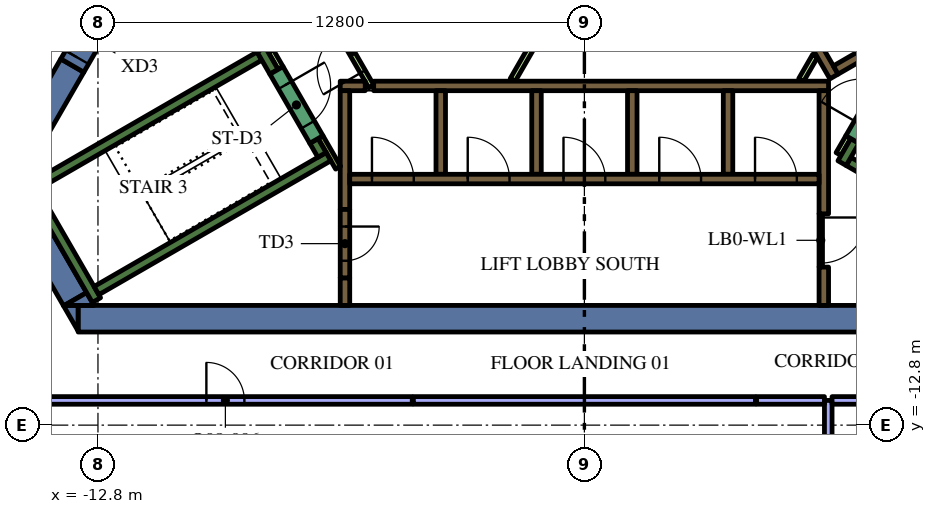
"""IFC4 building model, lengths in metres.
Left out: names, types, materials, properties, quantities, classifications, styles, units other than length and angle.
Written with IfcOpenShell. Run it as: python <this file> out.ifc"""

import sys

from ifc_helpers import new_model, si_unit, direction, frame, frame_2d, origin, place, context, subcontext, project, spatial, polyline, rectangle, outline, extrude, element, fill, save


model = new_model("IFC4")
c1 = context("Model", 3, precision=1e-05, world=origin(), true_north=direction((0.0, 1.0)))
c2 = subcontext(c1, "Body", "Model", "MODEL_VIEW")
j1 = project(units=[si_unit("LENGTHUNIT", "METRE"), si_unit("PLANEANGLEUNIT", "RADIAN")], contexts=[c1])
p1 = place(None, origin())
s1 = spatial("IfcSite", under=j1, at=p1, CompositionType="ELEMENT")
p2 = place(p1, origin())
s2 = spatial("IfcBuilding", under=s1, at=p2, CompositionType="ELEMENT")
p3 = place(p2, frame((0.0, 0.0, 235.2)))
s3 = spatial("IfcBuildingStorey", under=s2, at=p3, CompositionType="ELEMENT", Elevation=235.2)
p4 = place(p3, frame((8.904, -10.0, 0.0), z_axis=(0.0, 0.0, 1.0), x_axis=(-1.0, 0.0, 0.0)))
e1 = element("IfcWall", 1, at=p4, inside=s3, PredefinedType="SOLIDWALL", context=c2, shape_type="SweptSolid", body=[
    extrude(rectangle(XDim=22.226, YDim=0.7, at=frame_2d((11.113, 0.0))), origin(), (0.0, 0.0, 1.0), 4.2),
])
p5 = place(p3, origin())
e2 = element("IfcWall", 2, at=p5, inside=s3, PredefinedType="SOLIDWALL", context=c2, shape_type="SweptSolid", body=[
    extrude(outline(polyline([(-13.712, -9.65), (-13.324, -9.65), (-13.324, -10.322), (-13.712, -9.65)])), origin(), (0.0, 0.0, 1.0), 4.2),
])
p6 = place(p3, frame((-13.402, -9.487, 0.0), z_axis=(0.0, 0.0, 1.0), x_axis=(-0.500020498207, 0.866013568815, 0.0)))
e3 = element("IfcWall", 3, at=p6, inside=s3, PredefinedType="SOLIDWALL", context=c2, shape_type="SweptSolid", body=[
    extrude(rectangle(XDim=3.829, YDim=0.7, at=frame_2d((1.915, 0.0))), origin(), (0.0, 0.0, 1.0), 4.2),
])
e4 = element("IfcWall", 4, at=p5, inside=s3, PredefinedType="SOLIDWALL", context=c2, shape_type="SweptSolid", body=[
    extrude(outline(polyline([(-12.904, -9.65), (-13.68, -9.65), (-13.098, -9.314), (-12.904, -9.65)])), origin(), (0.0, 0.0, 1.0), 4.2),
])
p7 = place(p3, frame((-13.475, -3.339, 0.0), z_axis=(0.0, 0.0, 1.0), x_axis=(-0.499944726303, -0.866057313716, 0.0)))
e5 = element("IfcWall", 5, at=p7, inside=s3, PredefinedType="SOLIDWALL", context=c2, shape_type="SweptSolid", body=[
    extrude(rectangle(XDim=2.884, YDim=0.7, at=frame_2d((1.442, 0.0))), origin(), (0.0, 0.0, 1.0), 4.2),
])
p8 = place(p3, frame((12.84, -9.261, 0.0), z_axis=(0.0, 0.0, 1.0), x_axis=(-0.866013990052, 0.500019768644, 0.0)))
e6 = element("IfcWall", 6, at=p8, inside=s3, PredefinedType="SOLIDWALL", context=c2, shape_type="SweptSolid", body=[
    extrude(rectangle(XDim=6.8, YDim=0.25, at=frame_2d((3.4, 0.0))), origin(), (0.0, 0.0, 1.0), 4.2),
])
p9 = place(p3, frame((6.78, -5.906, 0.0), z_axis=(0.0, 0.0, 1.0), x_axis=(0.500223362819, 0.865896406789, 0.0)))
e7 = element("IfcWall", 7, at=p9, inside=s3, PredefinedType="SOLIDWALL", context=c2, shape_type="SweptSolid", body=[
    extrude(rectangle(XDim=0.675, YDim=0.25, at=frame_2d((0.337, 0.0))), origin(), (0.0, 0.0, 1.0), 4.2),
])
p10 = place(p3, frame((-12.84, -9.511, 0.0), z_axis=(0.0, 0.0, 1.0), x_axis=(-0.499997733992, 0.866026712061, 0.0)))
e8 = element("IfcWall", 8, at=p10, inside=s3, PredefinedType="SOLIDWALL", context=c2, shape_type="SweptSolid", body=[
    extrude(rectangle(XDim=3.634, YDim=0.25, at=frame_2d((1.817, 0.0))), origin(), (0.0, 0.0, 1.0), 4.2),
])
p11 = place(p3, frame((-14.44, -6.49, 0.0), z_axis=(0.0, 0.0, 1.0), x_axis=(0.866022966069, 0.500004222222, 0.0)))
e9 = element("IfcWall", 9, at=p11, inside=s3, PredefinedType="SOLIDWALL", context=c2, shape_type="SweptSolid", body=[
    extrude(rectangle(XDim=6.8, YDim=0.25, at=frame_2d((3.4, 0.0))), origin(), (0.0, 0.0, 1.0), 4.2),
])
p12 = place(p3, frame((-8.168, -3.503, 0.0), z_axis=(0.0, 0.0, 1.0), x_axis=(-0.499952099219, 0.866053057547, 0.0)))
e10 = element("IfcWall", 10, at=p12, inside=s3, PredefinedType="SOLIDWALL", context=c2, shape_type="SweptSolid", body=[
    extrude(rectangle(XDim=0.675, YDim=0.25, at=frame_2d((0.337, 0.0))), origin(), (0.0, 0.0, 1.0), 4.2),
])
p13 = place(p3, frame((-12.84, -9.261, 0.0), z_axis=(0.0, 0.0, 1.0), x_axis=(0.866016039709, 0.500016218704, 0.0)))
e11 = element("IfcWall", 11, at=p13, inside=s3, PredefinedType="SOLIDWALL", context=c2, shape_type="SweptSolid", body=[
    extrude(rectangle(XDim=7.05, YDim=0.25, at=frame_2d((3.525, 0.0))), origin(), (0.0, 0.0, 1.0), 4.2),
])
p14 = place(p3, frame((-6.905, -5.69, 0.0), z_axis=(0.0, 0.0, 1.0), x_axis=(-0.500402024738, 0.865793170242, 0.0)))
e12 = element("IfcWall", 12, at=p14, inside=s3, PredefinedType="SOLIDWALL", context=c2, shape_type="SweptSolid", body=[
    extrude(rectangle(XDim=0.425, YDim=0.25, at=frame_2d((0.212, 0.0))), origin(), (0.0, 0.0, 1.0), 4.2),
])
p15 = place(p3, frame((-6.3, -8.925, 0.0), z_axis=(0.0, 0.0, 1.0), x_axis=(0.0, -1.0, 0.0)))
e13 = element("IfcWall", 13, at=p15, inside=s3, PredefinedType="SOLIDWALL", context=c2, shape_type="SweptSolid", body=[
    extrude(rectangle(XDim=0.725, YDim=0.25, at=frame_2d((0.363, 0.0))), origin(), (0.0, 0.0, 1.0), 4.2),
])
p16 = place(p3, frame((-5.545, -3.875, 0.0), z_axis=(0.0, 0.0, 1.0), x_axis=(1.0, 0.0, 0.0)))
e14 = element("IfcWall", 14, at=p16, inside=s3, PredefinedType="SOLIDWALL", context=c2, shape_type="SweptSolid", body=[
    extrude(rectangle(XDim=11.97, YDim=0.25, at=frame_2d((5.985, 0.0))), origin(), (0.0, 0.0, 1.0), 4.2),
])
p17 = place(p3, frame((-6.425, -3.875, 0.0), z_axis=(0.0, 0.0, 1.0), x_axis=(1.0, 0.0, 0.0)))
e15 = element("IfcWall", 15, at=p17, inside=s3, PredefinedType="SOLIDWALL", context=c2, shape_type="SweptSolid", body=[
    extrude(rectangle(XDim=0.658, YDim=0.25, at=frame_2d((0.329, 0.0))), origin(), (0.0, 0.0, 1.0), 4.2),
])
p18 = place(p3, frame((6.3, -7.24, 0.0), z_axis=(0.0, 0.0, 1.0), x_axis=(0.0, 1.0, 0.0)))
e16 = element("IfcWall", 16, at=p18, inside=s3, PredefinedType="SOLIDWALL", context=c2, shape_type="SweptSolid", body=[
    extrude(rectangle(XDim=3.24, YDim=0.25, at=frame_2d((1.62, 0.0))), origin(), (0.0, 0.0, 1.0), 4.2),
])
p19 = place(p3, frame((6.3, -9.65, 0.0), z_axis=(0.0, 0.0, 1.0), x_axis=(0.0, 1.0, 0.0)))
e17 = element("IfcWall", 17, at=p19, inside=s3, PredefinedType="SOLIDWALL", context=c2, shape_type="SweptSolid", body=[
    extrude(rectangle(XDim=1.008, YDim=0.25, at=frame_2d((0.504, 0.0))), origin(), (0.0, 0.0, 1.0), 4.2),
])
for number, where, z_axis, x_axis in (
    (18, (3.78, -4.0, 0.0), (0.0, 0.0, 1.0), (0.0, -1.0, 0.0)),
    (19, (1.26, -4.0, 0.0), (0.0, 0.0, 1.0), (0.0, -1.0, 0.0)),
    (20, (-1.26, -4.0, 0.0), (0.0, 0.0, 1.0), (0.0, -1.0, 0.0)),
    (21, (-3.78, -4.0, 0.0), (0.0, 0.0, 1.0), (0.0, -1.0, 0.0)),
):
    element("IfcWall", number, at=place(p3, frame(where, z_axis=z_axis, x_axis=x_axis)), inside=s3, PredefinedType="SOLIDWALL", context=c2, shape_type="SweptSolid", body=[
        extrude(rectangle(XDim=2.2, YDim=0.25, at=frame_2d((1.1, 0.0))), origin(), (0.0, 0.0, 1.0), 4.2),
    ])
p20 = place(p3, frame((-6.3, -7.125, 0.0), z_axis=(0.0, 0.0, 1.0), x_axis=(0.0, 1.0, 0.0)))
e22 = element("IfcWall", 22, at=p20, inside=s3, PredefinedType="SOLIDWALL", context=c2, shape_type="SweptSolid", body=[
    extrude(rectangle(XDim=3.125, YDim=0.25, at=frame_2d((1.562, 0.0))), origin(), (0.0, 0.0, 1.0), 4.2),
])
p21 = place(p3, frame((6.568, -3.627, 0.0), z_axis=(0.0, 0.0, 1.0), x_axis=(-0.499999455981, 0.866025717874, 0.0)))
e23 = element("IfcWall", 23, at=p21, inside=s3, PredefinedType="SOLIDWALL", context=c2, shape_type="SweptSolid", body=[
    extrude(rectangle(XDim=11.978, YDim=0.25, at=frame_2d((5.989, 0.0))), origin(), (0.0, 0.0, 1.0), 4.2),
])
p22 = place(p3, frame((6.614, -3.456, 0.0), z_axis=(0.0, 0.0, 1.0), x_axis=(0.866032512851, 0.499987686533, 0.0)))
e24 = element("IfcWall", 24, at=p22, inside=s3, PredefinedType="SOLIDWALL", context=c2, shape_type="SweptSolid", body=[
    extrude(rectangle(XDim=2.975, YDim=0.25, at=frame_2d((1.487, 0.0))), origin(), (0.0, 0.0, 1.0), 4.2),
])
p23 = place(p3, frame((-8.252, -2.958, 0.0), z_axis=(0.0, 0.0, 1.0), x_axis=(0.500174715838, -0.865924508047, 0.0)))
e25 = element("IfcWall", 25, at=p23, inside=s3, PredefinedType="PARTITIONING", context=c2, shape_type="SweptSolid", body=[
    extrude(rectangle(XDim=0.514, YDim=0.15, at=frame_2d((0.257, 0.0))), origin(), (0.0, 0.0, 1.0), 3.45),
])
p24 = place(p3, frame((-6.48, -6.027, 0.0), z_axis=(0.0, 0.0, 1.0), x_axis=(-0.499927229454, 0.866067413802, 0.0)))
e26 = element("IfcWall", 26, at=p24, inside=s3, PredefinedType="PARTITIONING", context=c2, shape_type="SweptSolid", body=[
    extrude(rectangle(XDim=0.929, YDim=0.15, at=frame_2d((0.464, 0.0))), origin(), (0.0, 0.0, 1.0), 4.2),
])
p25 = place(p3, frame((6.945, -5.222, 0.0), z_axis=(0.0, 0.0, 1.0), x_axis=(-0.499818422106, -0.866130212453, 0.0)))
e27 = element("IfcWall", 27, at=p25, inside=s3, PredefinedType="PARTITIONING", context=c2, shape_type="SweptSolid", body=[
    extrude(rectangle(XDim=0.514, YDim=0.15, at=frame_2d((0.257, 0.0))), origin(), (0.0, 0.0, 1.0), 3.45),
])
p26 = place(p3, frame((5.705, -3.718, 0.0), z_axis=(0.0, 0.0, 1.0), x_axis=(0.499962090823, 0.866047289552, 0.0)))
e28 = element("IfcWall", 28, at=p26, inside=s3, PredefinedType="PARTITIONING", context=c2, shape_type="SweptSolid", body=[
    extrude(rectangle(XDim=0.735, YDim=0.15, at=frame_2d((0.367, 0.0))), origin(), (0.0, 0.0, 1.0), 3.45),
])
p27 = place(p3, frame((-1.887, -3.718, 0.0), z_axis=(0.0, 0.0, 1.0), x_axis=(0.500043732237, 0.866000153493, 0.0)))
e29 = element("IfcWall", 29, at=p27, inside=s3, PredefinedType="PARTITIONING", context=c2, shape_type="SweptSolid", body=[
    extrude(rectangle(XDim=3.114, YDim=0.15, at=frame_2d((1.557, 0.0))), origin(), (0.0, 0.0, 1.0), 3.45),
])
p28 = place(p3, frame((-6.175, -6.325, 0.0), z_axis=(0.0, 0.0, 1.0), x_axis=(1.0, 0.0, 0.0)))
e30 = element("IfcWall", 30, at=p28, inside=s3, PredefinedType="SOLIDWALL", context=c2, shape_type="SweptSolid", body=[
    extrude(rectangle(XDim=12.35, YDim=0.25, at=frame_2d((6.175, 0.0))), origin(), (0.0, 0.0, 1.0), 4.2),
])
p29 = place(p28, frame((0.585, 0.0, 0.0)))
e31 = element("IfcOpeningElement", 31, at=p29, cuts=e30, PredefinedType="OPENING", context=c2, shape_type="SweptSolid", body=[
    extrude(rectangle(XDim=1.1, YDim=2.1, at=frame_2d((0.55, 1.05))), frame((0.0, 0.135, 0.0), z_axis=(0.0, -1.0, 0.0), x_axis=(1.0, 0.0, 0.0)), (0.0, 0.0, 1.0), 0.27),
])
p30 = place(p28, frame((3.105, 0.0, 0.0)))
e32 = element("IfcOpeningElement", 32, at=p30, cuts=e30, PredefinedType="OPENING", context=c2, shape_type="SweptSolid", body=[
    extrude(rectangle(XDim=1.1, YDim=2.1, at=frame_2d((0.55, 1.05))), frame((0.0, 0.135, 0.0), z_axis=(0.0, -1.0, 0.0), x_axis=(1.0, 0.0, 0.0)), (0.0, 0.0, 1.0), 0.27),
])
p31 = place(p28, frame((5.625, 0.0, 0.0)))
e33 = element("IfcOpeningElement", 33, at=p31, cuts=e30, PredefinedType="OPENING", context=c2, shape_type="SweptSolid", body=[
    extrude(rectangle(XDim=1.1, YDim=2.1, at=frame_2d((0.55, 1.05))), frame((0.0, 0.135, 0.0), z_axis=(0.0, -1.0, 0.0), x_axis=(1.0, 0.0, 0.0)), (0.0, 0.0, 1.0), 0.27),
])
p32 = place(p28, frame((8.145, 0.0, 0.0)))
e34 = element("IfcOpeningElement", 34, at=p32, cuts=e30, PredefinedType="OPENING", context=c2, shape_type="SweptSolid", body=[
    extrude(rectangle(XDim=1.1, YDim=2.1, at=frame_2d((0.55, 1.05))), frame((0.0, 0.135, 0.0), z_axis=(0.0, -1.0, 0.0), x_axis=(1.0, 0.0, 0.0)), (0.0, 0.0, 1.0), 0.27),
])
p33 = place(p28, frame((10.665, 0.0, 0.0)))
e35 = element("IfcOpeningElement", 35, at=p33, cuts=e30, PredefinedType="OPENING", context=c2, shape_type="SweptSolid", body=[
    extrude(rectangle(XDim=1.1, YDim=2.1, at=frame_2d((0.55, 1.05))), frame((0.0, 0.135, 0.0), z_axis=(0.0, -1.0, 0.0), x_axis=(1.0, 0.0, 0.0)), (0.0, 0.0, 1.0), 0.27),
])
p34 = place(p3, frame((7.053, -5.284, 0.0), z_axis=(0.0, 0.0, 1.0), x_axis=(0.500078061341, 0.865980330357, 0.0)))
e36 = element("IfcWall", 36, at=p34, inside=s3, PredefinedType="SOLIDWALL", context=c2, shape_type="SweptSolid", body=[
    extrude(rectangle(XDim=2.1, YDim=0.4, at=frame_2d((1.05, 0.0))), origin(), (0.0, 0.0, 1.0), 4.2),
])
p35 = place(p34, frame((0.45, 0.0, 0.0)))
e37 = element("IfcOpeningElement", 37, at=p35, cuts=e36, PredefinedType="OPENING", context=c2, shape_type="SweptSolid", body=[
    extrude(rectangle(XDim=1.2, YDim=2.1, at=frame_2d((0.6, 1.05))), frame((0.0, 0.21, 0.0), z_axis=(0.0, -1.0, 0.0), x_axis=(1.0, 0.0, 0.0)), (0.0, 0.0, 1.0), 0.42),
])
p36 = place(p3, frame((-8.103, -3.466, 0.0), z_axis=(0.0, 0.0, 1.0), x_axis=(0.500078061341, -0.865980330357, 0.0)))
e38 = element("IfcWall", 38, at=p36, inside=s3, PredefinedType="SOLIDWALL", context=c2, shape_type="SweptSolid", body=[
    extrude(rectangle(XDim=2.1, YDim=0.4, at=frame_2d((1.05, 0.0))), origin(), (0.0, 0.0, 1.0), 4.2),
])
p37 = place(p36, frame((0.45, 0.0, 0.0)))
e39 = element("IfcOpeningElement", 39, at=p37, cuts=e38, PredefinedType="OPENING", context=c2, shape_type="SweptSolid", body=[
    extrude(rectangle(XDim=1.2, YDim=2.1, at=frame_2d((0.6, 1.05))), frame((0.0, 0.21, 0.0), z_axis=(0.0, -1.0, 0.0), x_axis=(1.0, 0.0, 0.0)), (0.0, 0.0, 1.0), 0.42),
])
p38 = place(p3, frame((-6.3, -7.125, 0.0), z_axis=(0.0, 0.0, 1.0), x_axis=(0.0, -1.0, 0.0)))
e40 = element("IfcWall", 40, at=p38, inside=s3, PredefinedType="SOLIDWALL", context=c2, shape_type="SweptSolid", body=[
    extrude(rectangle(XDim=1.8, YDim=0.25, at=frame_2d((0.9, 0.0))), origin(), (0.0, 0.0, 1.0), 4.2),
])
p39 = place(p38, frame((0.45, 0.0, 0.0)))
e41 = element("IfcOpeningElement", 41, at=p39, cuts=e40, PredefinedType="OPENING", context=c2, shape_type="SweptSolid", body=[
    extrude(rectangle(XDim=0.9, YDim=2.1, at=frame_2d((0.45, 1.05))), frame((0.0, 0.135, 0.0), z_axis=(0.0, -1.0, 0.0), x_axis=(1.0, 0.0, 0.0)), (0.0, 0.0, 1.0), 0.27),
])
p40 = place(p3, frame((-5.606, -3.89, 0.0), z_axis=(0.0, 0.0, 1.0), x_axis=(-0.500027713859, 0.866009402589, 0.0)))
e42 = element("IfcWall", 42, at=p40, inside=s3, PredefinedType="PARTITIONING", context=c2, shape_type="SweptSolid", body=[
    extrude(rectangle(XDim=2.1, YDim=0.15, at=frame_2d((1.05, 0.0))), origin(), (0.0, 0.0, 1.0), 3.45),
])
p41 = place(p40, frame((0.45, 0.0, 0.0)))
e43 = element("IfcOpeningElement", 43, at=p41, cuts=e42, PredefinedType="OPENING", context=c2, shape_type="SweptSolid", body=[
    extrude(rectangle(XDim=1.2, YDim=2.1, at=frame_2d((0.6, 1.05))), frame((0.0, 0.085, 0.0), z_axis=(0.0, -1.0, 0.0), x_axis=(1.0, 0.0, 0.0)), (0.0, 0.0, 1.0), 0.17),
])
p42 = place(p3, frame((6.22, -7.237, 0.0), z_axis=(0.0, 0.0, 1.0), x_axis=(0.0, -1.0, 0.0)))
e44 = element("IfcWall", 44, at=p42, inside=s3, PredefinedType="PARTITIONING", context=c2, shape_type="SweptSolid", body=[
    extrude(rectangle(XDim=1.4, YDim=0.09, at=frame_2d((0.7, 0.0))), origin(), (0.0, 0.0, 1.0), 3.45),
])
p43 = place(p42, frame((0.1, 0.0, 0.0)))
e45 = element("IfcOpeningElement", 45, at=p43, cuts=e44, PredefinedType="OPENING", context=c2, shape_type="SweptSolid", body=[
    extrude(rectangle(XDim=1.2, YDim=2.1, at=frame_2d((0.6, 1.05))), frame((0.0, 0.055, 0.0), z_axis=(0.0, -1.0, 0.0), x_axis=(1.0, 0.0, 0.0)), (0.0, 0.0, 1.0), 0.11),
])
p44 = place(p3, frame((-13.475, -3.339, 0.0), z_axis=(0.0, 0.0, 1.0), x_axis=(0.499954529098, 0.86605165483, 0.0)))
e46 = element("IfcWall", 46, at=p44, inside=s3, PredefinedType="SOLIDWALL", context=c2, shape_type="SweptSolid", body=[
    extrude(rectangle(XDim=1.7, YDim=0.7, at=frame_2d((0.85, 0.0))), origin(), (0.0, 0.0, 1.0), 4.2),
])
p45 = place(p44, frame((0.25, 0.0, 0.0)))
e47 = element("IfcOpeningElement", 47, at=p45, cuts=e46, PredefinedType="OPENING", context=c2, shape_type="SweptSolid", body=[
    extrude(rectangle(XDim=1.2, YDim=2.1, at=frame_2d((0.6, 1.05))), frame((0.0, 0.36, 0.0), z_axis=(0.0, -1.0, 0.0), x_axis=(1.0, 0.0, 0.0)), (0.0, 0.0, 1.0), 0.72),
])
p46 = place(p3, frame((6.417, -12.15, 0.0), z_axis=(0.0, 0.0, 1.0), x_axis=(0.0, -1.0, 0.0)))
e48 = element("IfcWall", 48, at=p46, inside=s3, PredefinedType="PARTITIONING", context=c2, shape_type="SweptSolid", body=[
    extrude(rectangle(XDim=3.704, YDim=0.2, at=frame_2d((1.852, 0.0))), origin(), (0.0, 0.0, 1.0), 3.45),
])
p47 = place(p3, frame((-4.5, -12.15, 0.0), z_axis=(0.0, 0.0, 1.0), x_axis=(1.0, 0.0, 0.0)))
e49 = element("IfcWall", 49, at=p47, inside=s3, PredefinedType="PARTITIONING", context=c2, shape_type="SweptSolid", body=[
    extrude(rectangle(XDim=9.0, YDim=0.2, at=frame_2d((4.5, 0.0))), origin(), (0.0, 0.0, 1.0), 3.45),
])
p48 = place(p3, frame((-14.347, -12.15, 0.0), z_axis=(0.0, 0.0, 1.0), x_axis=(1.0, 0.0, 0.0)))
e50 = element("IfcWall", 50, at=p48, inside=s3, PredefinedType="PARTITIONING", context=c2, shape_type="SweptSolid", body=[
    extrude(rectangle(XDim=9.817, YDim=0.2, at=frame_2d((4.909, 0.0))), origin(), (0.0, 0.0, 1.0), 3.45),
])
p49 = place(p48, frame((4.4, 0.0, 0.0)))
e51 = element("IfcOpeningElement", 51, at=p49, cuts=e50, PredefinedType="OPENING", context=c2, shape_type="SweptSolid", body=[
    extrude(rectangle(XDim=1.0, YDim=2.1, at=frame_2d((0.5, 1.05))), frame((0.0, 0.11, 0.0), z_axis=(0.0, -1.0, 0.0), x_axis=(1.0, 0.0, 0.0)), (0.0, 0.0, 1.0), 0.22),
])
p50 = place(p3, frame((4.53, -12.15, 0.0), z_axis=(0.0, 0.0, 1.0), x_axis=(1.0, 0.0, 0.0)))
e52 = element("IfcWall", 52, at=p50, inside=s3, PredefinedType="PARTITIONING", context=c2, shape_type="SweptSolid", body=[
    extrude(rectangle(XDim=1.787, YDim=0.2, at=frame_2d((0.894, 0.0))), origin(), (0.0, 0.0, 1.0), 3.45),
])
p51 = place(p3, frame((6.517, -12.15, 0.0), z_axis=(0.0, 0.0, 1.0), x_axis=(1.0, 0.0, 0.0)))
e53 = element("IfcWall", 53, at=p51, inside=s3, PredefinedType="PARTITIONING", context=c2, shape_type="SweptSolid", body=[
    extrude(rectangle(XDim=7.83, YDim=0.2, at=frame_2d((3.915, 0.0))), origin(), (0.0, 0.0, 1.0), 3.45),
])
p52 = place(p51, frame((3.4, 0.0, 0.0)))
e54 = element("IfcOpeningElement", 54, at=p52, cuts=e53, PredefinedType="OPENING", context=c2, shape_type="SweptSolid", body=[
    extrude(rectangle(XDim=1.0, YDim=2.1, at=frame_2d((0.5, 1.05))), frame((0.0, 0.11, 0.0), z_axis=(0.0, -1.0, 0.0), x_axis=(1.0, 0.0, 0.0)), (0.0, 0.0, 1.0), 0.22),
])
p53 = place(p29, origin())
e55 = element("IfcDoor", 55, at=p53, inside=s3, OperationType="DOUBLE_DOOR_SLIDING", PredefinedType="DOOR", context=c2, shape_type="SweptSolid", body=[
    extrude(rectangle(XDim=1.1, YDim=2.1, at=frame_2d((0.55, 1.05))), frame((0.0, 0.025, 0.0), z_axis=(0.0, -1.0, 0.0), x_axis=(1.0, 0.0, 0.0)), (0.0, 0.0, 1.0), 0.05),
])
fill(e31, e55)
p54 = place(p30, origin())
e56 = element("IfcDoor", 56, at=p54, inside=s3, OperationType="DOUBLE_DOOR_SLIDING", PredefinedType="DOOR", context=c2, shape_type="SweptSolid", body=[
    extrude(rectangle(XDim=1.1, YDim=2.1, at=frame_2d((0.55, 1.05))), frame((0.0, 0.025, 0.0), z_axis=(0.0, -1.0, 0.0), x_axis=(1.0, 0.0, 0.0)), (0.0, 0.0, 1.0), 0.05),
])
fill(e32, e56)
p55 = place(p31, origin())
e57 = element("IfcDoor", 57, at=p55, inside=s3, OperationType="DOUBLE_DOOR_SLIDING", PredefinedType="DOOR", context=c2, shape_type="SweptSolid", body=[
    extrude(rectangle(XDim=1.1, YDim=2.1, at=frame_2d((0.55, 1.05))), frame((0.0, 0.025, 0.0), z_axis=(0.0, -1.0, 0.0), x_axis=(1.0, 0.0, 0.0)), (0.0, 0.0, 1.0), 0.05),
])
fill(e33, e57)
p56 = place(p32, origin())
e58 = element("IfcDoor", 58, at=p56, inside=s3, OperationType="DOUBLE_DOOR_SLIDING", PredefinedType="DOOR", context=c2, shape_type="SweptSolid", body=[
    extrude(rectangle(XDim=1.1, YDim=2.1, at=frame_2d((0.55, 1.05))), frame((0.0, 0.025, 0.0), z_axis=(0.0, -1.0, 0.0), x_axis=(1.0, 0.0, 0.0)), (0.0, 0.0, 1.0), 0.05),
])
fill(e34, e58)
p57 = place(p33, origin())
e59 = element("IfcDoor", 59, at=p57, inside=s3, OperationType="DOUBLE_DOOR_SLIDING", PredefinedType="DOOR", context=c2, shape_type="SweptSolid", body=[
    extrude(rectangle(XDim=1.1, YDim=2.1, at=frame_2d((0.55, 1.05))), frame((0.0, 0.025, 0.0), z_axis=(0.0, -1.0, 0.0), x_axis=(1.0, 0.0, 0.0)), (0.0, 0.0, 1.0), 0.05),
])
fill(e35, e59)
p58 = place(p37, origin())
e60 = element("IfcDoor", 60, at=p58, inside=s3, OperationType="SINGLE_SWING_LEFT", PredefinedType="DOOR", context=c2, shape_type="SweptSolid", body=[
    extrude(rectangle(XDim=1.2, YDim=2.1, at=frame_2d((0.6, 1.05))), frame((0.0, 0.025, 0.0), z_axis=(0.0, -1.0, 0.0), x_axis=(1.0, 0.0, 0.0)), (0.0, 0.0, 1.0), 0.05),
])
fill(e39, e60)
p59 = place(p39, origin())
e61 = element("IfcDoor", 61, at=p59, inside=s3, OperationType="SINGLE_SWING_LEFT", PredefinedType="DOOR", context=c2, shape_type="SweptSolid", body=[
    extrude(rectangle(XDim=0.9, YDim=2.1, at=frame_2d((0.45, 1.05))), frame((0.0, 0.025, 0.0), z_axis=(0.0, -1.0, 0.0), x_axis=(1.0, 0.0, 0.0)), (0.0, 0.0, 1.0), 0.05),
])
fill(e41, e61)
p60 = place(p41, origin())
e62 = element("IfcDoor", 62, at=p60, inside=s3, OperationType="SINGLE_SWING_LEFT", PredefinedType="DOOR", context=c2, shape_type="SweptSolid", body=[
    extrude(rectangle(XDim=1.2, YDim=2.1, at=frame_2d((0.6, 1.05))), frame((0.0, 0.025, 0.0), z_axis=(0.0, -1.0, 0.0), x_axis=(1.0, 0.0, 0.0)), (0.0, 0.0, 1.0), 0.05),
])
fill(e43, e62)
p61 = place(p43, origin())
e63 = element("IfcDoor", 63, at=p61, inside=s3, OperationType="SINGLE_SWING_LEFT", PredefinedType="DOOR", context=c2, shape_type="SweptSolid", body=[
    extrude(rectangle(XDim=1.2, YDim=2.1, at=frame_2d((0.6, 1.05))), frame((0.0, 0.025, 0.0), z_axis=(0.0, -1.0, 0.0), x_axis=(1.0, 0.0, 0.0)), (0.0, 0.0, 1.0), 0.05),
])
fill(e45, e63)
p62 = place(p45, origin())
e64 = element("IfcDoor", 64, at=p62, inside=s3, OperationType="SINGLE_SWING_LEFT", PredefinedType="DOOR", context=c2, shape_type="SweptSolid", body=[
    extrude(rectangle(XDim=1.2, YDim=2.1, at=frame_2d((0.6, 1.05))), frame((0.0, 0.025, 0.0), z_axis=(0.0, -1.0, 0.0), x_axis=(1.0, 0.0, 0.0)), (0.0, 0.0, 1.0), 0.05),
])
fill(e47, e64)
p63 = place(p49, origin())
e65 = element("IfcDoor", 65, at=p63, inside=s3, OperationType="SINGLE_SWING_LEFT", PredefinedType="DOOR", context=c2, shape_type="SweptSolid", body=[
    extrude(rectangle(XDim=1.0, YDim=2.1, at=frame_2d((0.5, 1.05))), frame((0.0, 0.025, 0.0), z_axis=(0.0, -1.0, 0.0), x_axis=(1.0, 0.0, 0.0)), (0.0, 0.0, 1.0), 0.05),
])
fill(e51, e65)
save(model, sys.argv[1])
